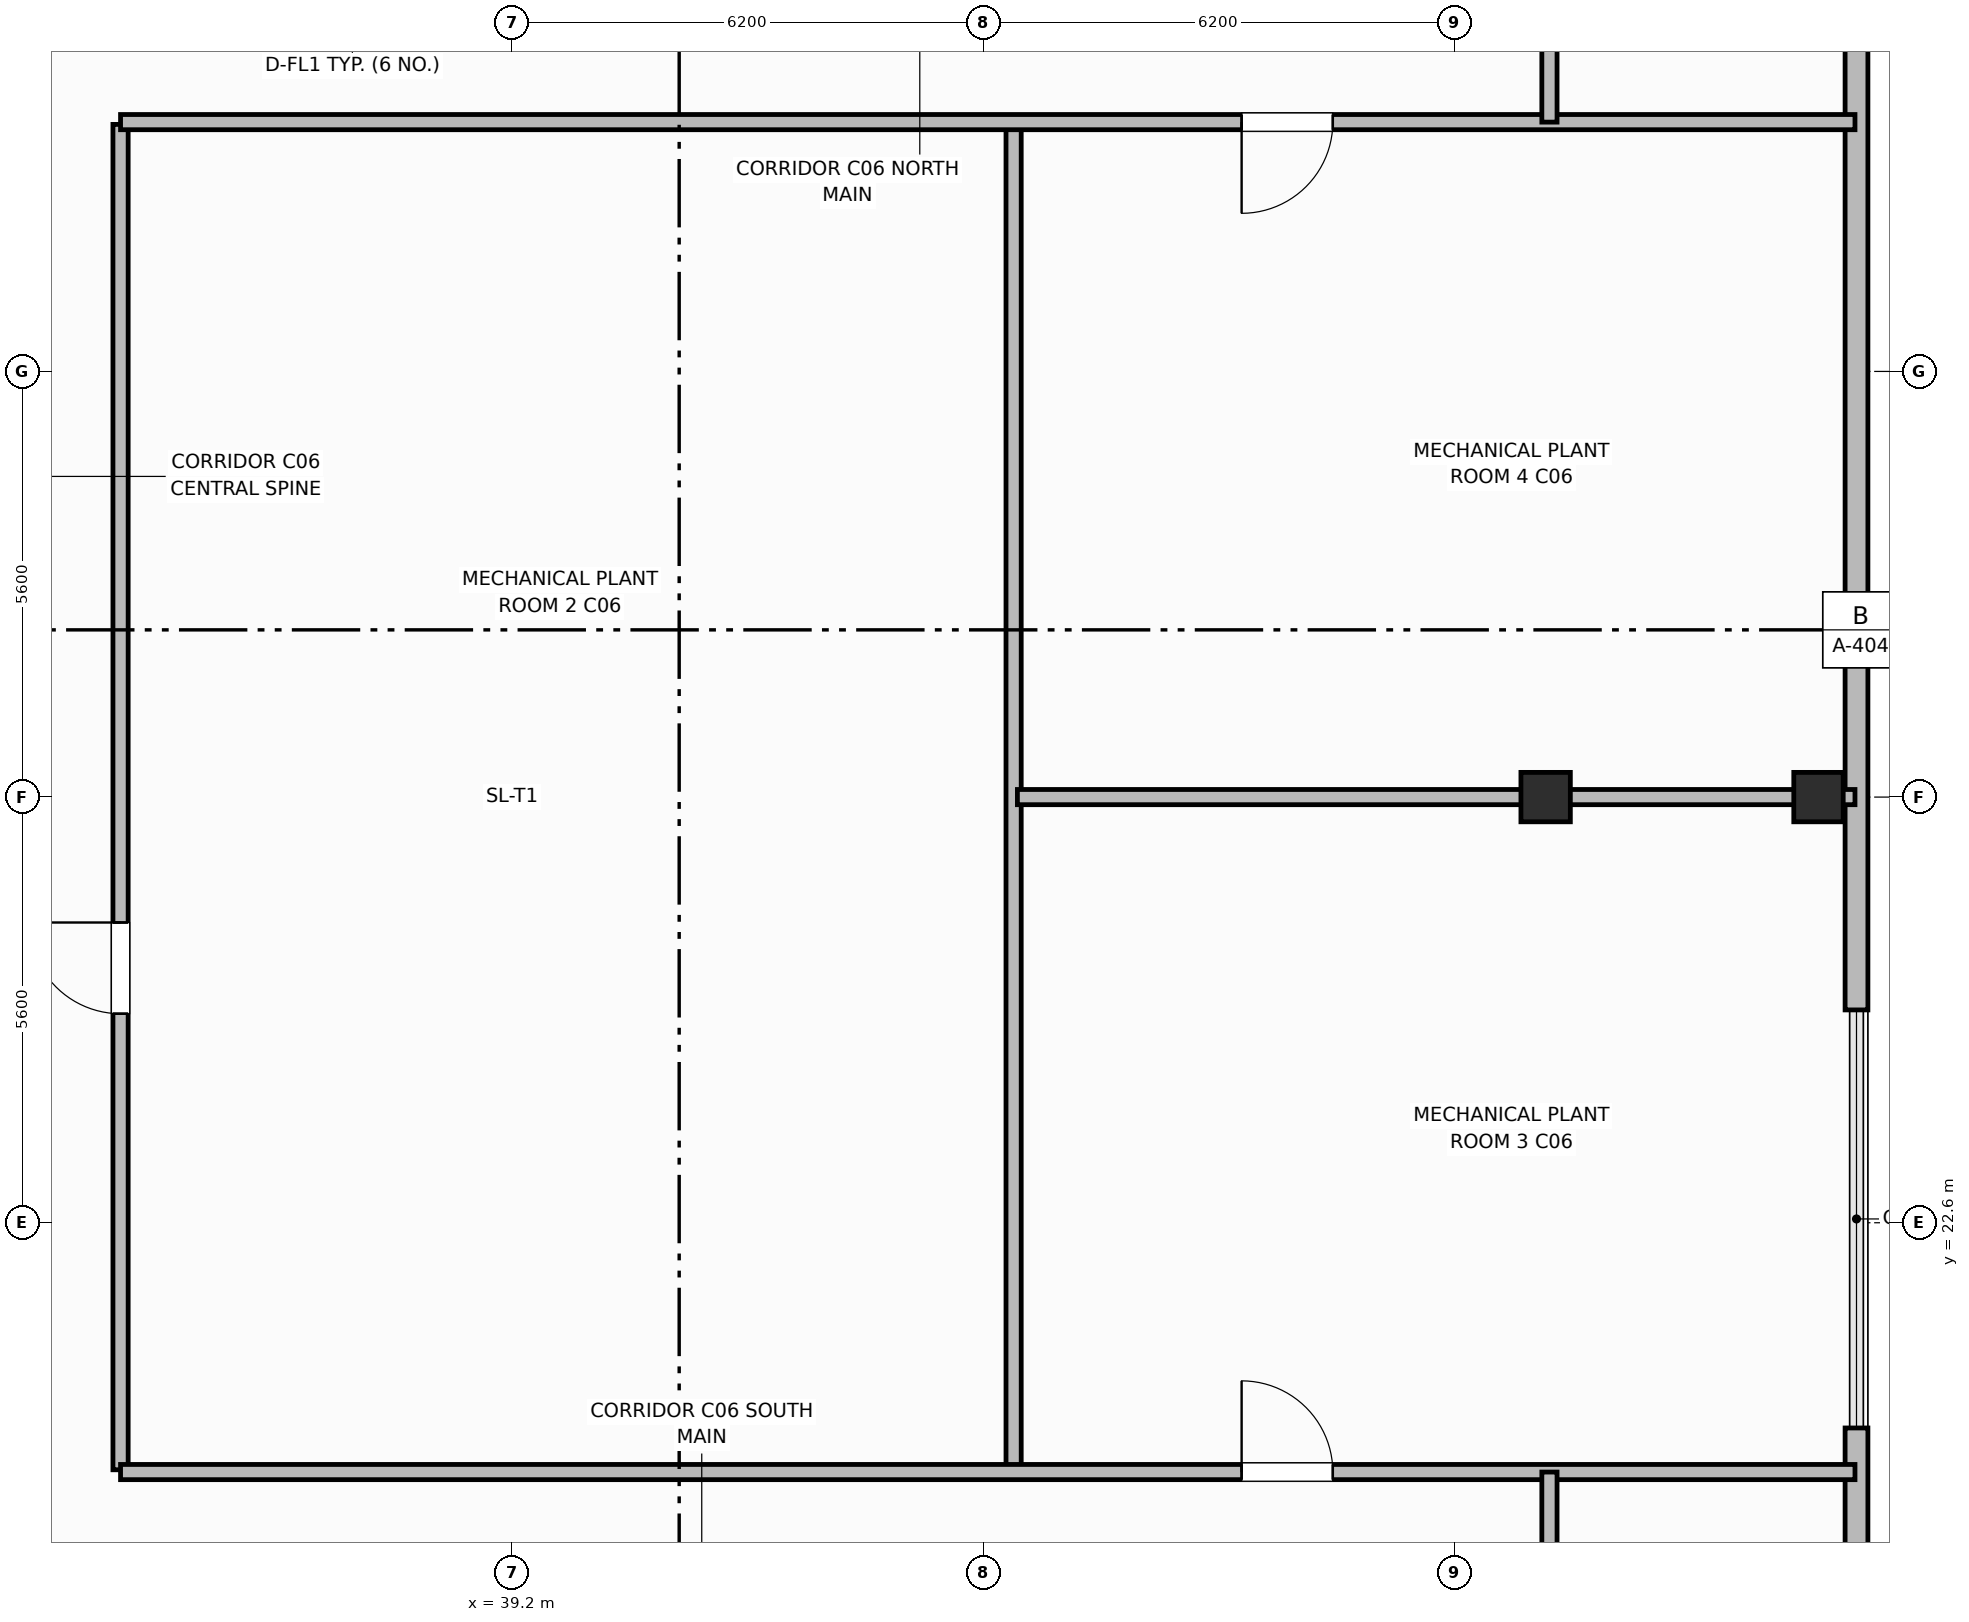
"""IFC4 building model, lengths in metres.
Left out: names, types, materials, properties, quantities, classifications, styles, units other than length and angle.
Written with IfcOpenShell. Run it as: python <this file> out.ifc"""

import sys

from ifc_helpers import new_model, si_unit, direction, frame, frame_2d, origin, origin_2d, place, context, subcontext, project, spatial, rectangle, extrude, element, fill, save


model = new_model("IFC4")
c1 = context("Model", 3, precision=1e-05, world=origin(), true_north=direction((0.0, 1.0)))
c2 = subcontext(c1, "Body", "Model", "MODEL_VIEW")
j1 = project(units=[si_unit("LENGTHUNIT", "METRE"), si_unit("PLANEANGLEUNIT", "RADIAN")], contexts=[c1])
p1 = place(None, origin())
s1 = spatial("IfcSite", under=j1, at=p1, CompositionType="ELEMENT")
p2 = place(p1, origin())
s2 = spatial("IfcBuilding", under=s1, at=p2, CompositionType="ELEMENT")
p3 = place(p2, frame((0.0, 0.0, 320.0)))
s3 = spatial("IfcBuildingStorey", under=s2, at=p3, CompositionType="ELEMENT", Elevation=320.0)
for number, where, z_axis, x_axis in (
    (1, (52.8, 28.2, 0.0), (0.0, 0.0, 1.0), (1.0, 0.0, 0.0)),
    (2, (56.39, 28.2, 0.0), (0.0, 0.0, 1.0), (1.0, 0.0, 0.0)),
):
    element("IfcColumn", number, at=place(p3, frame(where, z_axis=z_axis, x_axis=x_axis)), inside=s3, PredefinedType="COLUMN", context=c2, shape_type="SweptSolid", body=[
        extrude(rectangle(XDim=0.65, YDim=0.65, at=origin_2d()), origin(), (0.0, 0.0, 1.0), 3.6),
    ])
p4 = place(p3, frame((56.89, 12.25, 0.0), z_axis=(0.0, 0.0, 1.0), x_axis=(0.0, 1.0, 0.0)))
e3 = element("IfcWall", 3, at=p4, inside=s3, PredefinedType="SOLIDWALL", context=c2, shape_type="SweptSolid", body=[
    extrude(rectangle(XDim=7.65, YDim=0.3, at=frame_2d((3.825, 0.0))), origin(), (0.0, 0.0, 1.0), 2.83),
])
p5 = place(p3, frame((56.89, 25.4, 0.0), z_axis=(0.0, 0.0, 1.0), x_axis=(0.0, 1.0, 0.0)))
e4 = element("IfcWall", 4, at=p5, inside=s3, PredefinedType="SOLIDWALL", context=c2, shape_type="SweptSolid", body=[
    extrude(rectangle(XDim=18.75, YDim=0.3, at=frame_2d((9.375, 0.0))), origin(), (0.0, 0.0, 1.0), 2.83),
])
p6 = place(p3, frame((34.05, 19.35, 0.0), z_axis=(0.0, 0.0, 1.0), x_axis=(0.0, 1.0, 0.0)))
e5 = element("IfcWall", 5, at=p6, inside=s3, PredefinedType="PARTITIONING", context=c2, shape_type="SweptSolid", body=[
    extrude(rectangle(XDim=17.7, YDim=0.2, at=frame_2d((8.85, 0.0))), origin(), (0.0, 0.0, 1.0), 2.53),
])
p7 = place(p6, frame((6.0, 0.0, 0.0)))
e6 = element("IfcOpeningElement", 6, at=p7, cuts=e5, PredefinedType="OPENING", context=c2, shape_type="SweptSolid", body=[
    extrude(rectangle(XDim=1.2, YDim=2.15, at=frame_2d((0.6, 1.075))), frame((0.0, 0.11, 0.0), z_axis=(0.0, -1.0, 0.0), x_axis=(1.0, 0.0, 0.0)), (0.0, 0.0, 1.0), 0.22),
])
p8 = place(p3, frame((45.8, 19.35, 0.0), z_axis=(0.0, 0.0, 1.0), x_axis=(0.0, 1.0, 0.0)))
e7 = element("IfcWall", 7, at=p8, inside=s3, PredefinedType="PARTITIONING", context=c2, shape_type="SweptSolid", body=[
    extrude(rectangle(XDim=17.7, YDim=0.2, at=frame_2d((8.85, 0.0))), origin(), (0.0, 0.0, 1.0), 2.53),
])
p9 = place(p3, frame((45.85, 28.2, 0.0), z_axis=(0.0, 0.0, 1.0), x_axis=(1.0, 0.0, 0.0)))
e8 = element("IfcWall", 8, at=p9, inside=s3, PredefinedType="PARTITIONING", context=c2, shape_type="SweptSolid", body=[
    extrude(rectangle(XDim=11.02, YDim=0.2, at=frame_2d((5.51, 0.0))), origin(), (0.0, 0.0, 1.0), 2.53),
])
p10 = place(p3, frame((34.05, 19.32, 0.0), z_axis=(0.0, 0.0, 1.0), x_axis=(1.0, 0.0, 0.0)))
e9 = element("IfcWall", 9, at=p10, inside=s3, PredefinedType="PARTITIONING", context=c2, shape_type="SweptSolid", body=[
    extrude(rectangle(XDim=22.82, YDim=0.2, at=frame_2d((11.41, 0.0))), origin(), (0.0, 0.0, 1.0), 2.53),
])
p11 = place(p10, frame((14.75, 0.0, 0.0)))
e10 = element("IfcOpeningElement", 10, at=p11, cuts=e9, PredefinedType="OPENING", context=c2, shape_type="SweptSolid", body=[
    extrude(rectangle(XDim=1.2, YDim=2.15, at=frame_2d((0.6, 1.075))), frame((0.0, 0.11, 0.0), z_axis=(0.0, -1.0, 0.0), x_axis=(1.0, 0.0, 0.0)), (0.0, 0.0, 1.0), 0.22),
])
p12 = place(p3, frame((56.87, 37.08, 0.0), z_axis=(0.0, 0.0, 1.0), x_axis=(-1.0, 0.0, 0.0)))
e11 = element("IfcWall", 11, at=p12, inside=s3, PredefinedType="PARTITIONING", context=c2, shape_type="SweptSolid", body=[
    extrude(rectangle(XDim=22.82, YDim=0.2, at=frame_2d((11.41, 0.0))), origin(), (0.0, 0.0, 1.0), 2.53),
])
p13 = place(p12, frame((6.87, 0.0, 0.0)))
e12 = element("IfcOpeningElement", 12, at=p13, cuts=e11, PredefinedType="OPENING", context=c2, shape_type="SweptSolid", body=[
    extrude(rectangle(XDim=1.2, YDim=2.15, at=frame_2d((0.6, 1.075))), frame((0.0, 0.11, 0.0), z_axis=(0.0, -1.0, 0.0), x_axis=(1.0, 0.0, 0.0)), (0.0, 0.0, 1.0), 0.22),
])
p14 = place(p3, frame((52.85, 16.95, 0.0), z_axis=(0.0, 0.0, 1.0), x_axis=(0.0, 1.0, 0.0)))
e13 = element("IfcWall", 13, at=p14, inside=s3, PredefinedType="PARTITIONING", context=c2, shape_type="SweptSolid", body=[
    extrude(rectangle(XDim=2.37, YDim=0.2, at=frame_2d((1.185, 0.0))), origin(), (0.0, 0.0, 1.0), 2.53),
])
p15 = place(p3, frame((52.85, 37.08, 0.0), z_axis=(0.0, 0.0, 1.0), x_axis=(0.0, 1.0, 0.0)))
e14 = element("IfcWall", 14, at=p15, inside=s3, PredefinedType="PARTITIONING", context=c2, shape_type="SweptSolid", body=[
    extrude(rectangle(XDim=2.37, YDim=0.2, at=frame_2d((1.185, 0.0))), origin(), (0.0, 0.0, 1.0), 2.53),
])
p16 = place(p7, origin())
e15 = element("IfcDoor", 15, at=p16, inside=s3, OperationType="SINGLE_SWING_RIGHT", PredefinedType="DOOR", context=c2, shape_type="SweptSolid", body=[
    extrude(rectangle(XDim=1.2, YDim=2.15, at=frame_2d((0.6, 1.075))), frame((0.0, 0.025, 0.0), z_axis=(0.0, -1.0, 0.0), x_axis=(1.0, 0.0, 0.0)), (0.0, 0.0, 1.0), 0.05),
])
fill(e6, e15)
p17 = place(p11, origin())
e16 = element("IfcDoor", 16, at=p17, inside=s3, OperationType="SINGLE_SWING_LEFT", PredefinedType="DOOR", context=c2, shape_type="SweptSolid", body=[
    extrude(rectangle(XDim=1.2, YDim=2.15, at=frame_2d((0.6, 1.075))), frame((0.0, 0.025, 0.0), z_axis=(0.0, -1.0, 0.0), x_axis=(1.0, 0.0, 0.0)), (0.0, 0.0, 1.0), 0.05),
])
fill(e10, e16)
p18 = place(p13, origin())
e17 = element("IfcDoor", 17, at=p18, inside=s3, OperationType="SINGLE_SWING_RIGHT", PredefinedType="DOOR", context=c2, shape_type="SweptSolid", body=[
    extrude(rectangle(XDim=1.2, YDim=2.15, at=frame_2d((0.6, 1.075))), frame((0.0, 0.025, 0.0), z_axis=(0.0, -1.0, 0.0), x_axis=(1.0, 0.0, 0.0)), (0.0, 0.0, 1.0), 0.05),
])
fill(e12, e17)
save(model, sys.argv[1])
